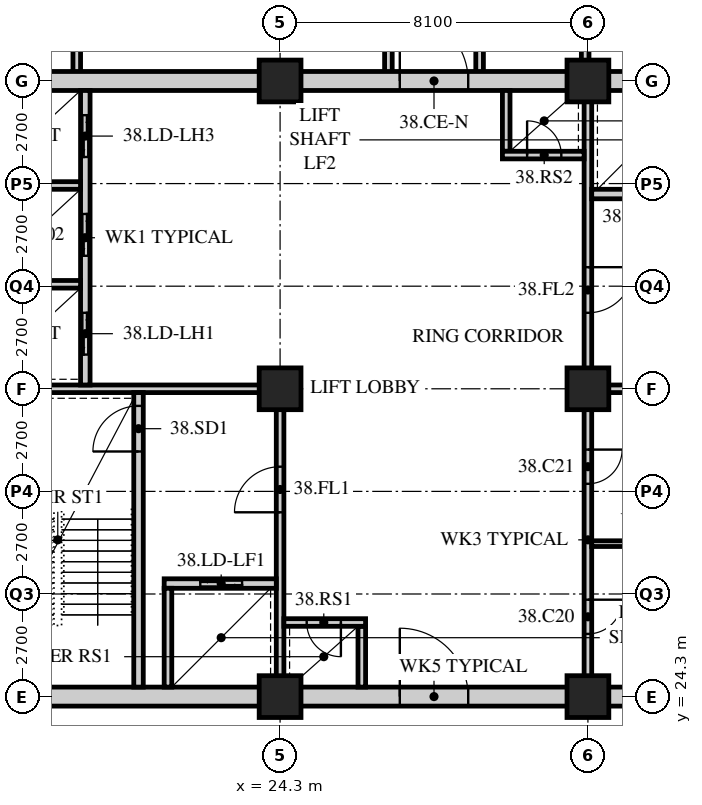
"""IFC4 building model, lengths in metres.
Left out: names, types, materials, properties, quantities, classifications, styles, units other than length and angle.
Written with IfcOpenShell. Run it as: python <this file> out.ifc"""

import sys

from ifc_helpers import new_model, si_unit, direction, frame, frame_2d, origin, origin_2d, place, context, subcontext, project, spatial, rectangle, hollow_rectangle, extrude, element, fill, save


model = new_model("IFC4")
c1 = context("Model", 3, precision=1e-05, world=origin(), true_north=direction((0.0, 1.0)))
c2 = subcontext(c1, "Body", "Model", "MODEL_VIEW")
j1 = project(units=[si_unit("LENGTHUNIT", "METRE"), si_unit("PLANEANGLEUNIT", "RADIAN")], contexts=[c1])
p1 = place(None, origin())
s1 = spatial("IfcSite", under=j1, at=p1, CompositionType="ELEMENT")
p2 = place(p1, origin())
s2 = spatial("IfcBuilding", under=s1, at=p2, CompositionType="ELEMENT")
p3 = place(p2, frame((0.0, 0.0, 147.6)))
s3 = spatial("IfcBuildingStorey", under=s2, at=p3, CompositionType="ELEMENT", Elevation=147.6)
for number, where, z_axis, x_axis in (
    (1, (24.3, 24.3, 0.0), (0.0, 0.0, 1.0), (1.0, 0.0, 0.0)),
    (2, (24.3, 32.4, 0.0), (0.0, 0.0, 1.0), (1.0, 0.0, 0.0)),
    (3, (24.3, 40.5, 0.0), (0.0, 0.0, 1.0), (1.0, 0.0, 0.0)),
    (4, (32.4, 24.3, 0.0), (0.0, 0.0, 1.0), (1.0, 0.0, 0.0)),
    (5, (32.4, 32.4, 0.0), (0.0, 0.0, 1.0), (1.0, 0.0, 0.0)),
    (6, (32.4, 40.5, 0.0), (0.0, 0.0, 1.0), (1.0, 0.0, 0.0)),
):
    element("IfcColumn", number, at=place(p3, frame(where, z_axis=z_axis, x_axis=x_axis)), inside=s3, PredefinedType="COLUMN", context=c2, shape_type="SweptSolid", body=[
        extrude(hollow_rectangle(XDim=1.1, YDim=1.1, WallThickness=0.1, at=origin_2d()), origin(), (0.0, 0.0, 1.0), 3.4),
    ])
p4 = place(p3, frame((18.95, 44.1, 0.0), z_axis=(0.0, 0.0, 1.0), x_axis=(0.0, -1.0, 0.0)))
e7 = element("IfcWall", 7, at=p4, inside=s3, PredefinedType="SOLIDWALL", context=c2, shape_type="SweptSolid", body=[
    extrude(rectangle(XDim=3.6, YDim=0.2, at=frame_2d((1.8, 0.0))), origin(), (0.0, 0.0, 1.0), 3.19),
])
p5 = place(p3, frame((32.328, 44.1, 0.0), z_axis=(0.0, 0.0, 1.0), x_axis=(0.0, -1.0, 0.0)))
e8 = element("IfcWall", 8, at=p5, inside=s3, PredefinedType="SOLIDWALL", context=c2, shape_type="SweptSolid", body=[
    extrude(rectangle(XDim=3.6, YDim=0.2, at=frame_2d((1.8, 0.0))), origin(), (0.0, 0.0, 1.0), 2.42),
])
for number, where, z_axis, x_axis in (
    (9, (27.15, 40.5, 0.0), (0.0, 0.0, 1.0), (0.0, 1.0, 0.0)),
    (10, (29.55, 40.5, 0.0), (0.0, 0.0, 1.0), (0.0, 1.0, 0.0)),
):
    element("IfcWall", number, at=place(p3, frame(where, z_axis=z_axis, x_axis=x_axis)), inside=s3, PredefinedType="SOLIDWALL", context=c2, shape_type="SweptSolid", body=[
        extrude(rectangle(XDim=3.6, YDim=0.2, at=frame_2d((1.8, 0.0))), origin(), (0.0, 0.0, 1.0), 3.19),
    ])
p6 = place(p3, frame((15.95, 24.3, 0.0), z_axis=(0.0, 0.0, 1.0), x_axis=(1.0, 0.0, 0.0)))
e11 = element("IfcWall", 11, at=p6, inside=s3, PredefinedType="SOLIDWALL", context=c2, shape_type="SweptSolid", body=[
    extrude(rectangle(XDim=24.8, YDim=0.5, at=frame_2d((12.4, 0.0))), origin(), (0.0, 0.0, 1.0), 2.42),
])
p7 = place(p6, frame((11.5, 0.0, 0.0)))
e12 = element("IfcOpeningElement", 12, at=p7, cuts=e11, PredefinedType="OPENING", context=c2, shape_type="SweptSolid", body=[
    extrude(rectangle(XDim=1.8, YDim=2.4, at=frame_2d((0.9, 1.2))), frame((0.0, 0.26, 0.0), z_axis=(0.0, -1.0, 0.0), x_axis=(1.0, 0.0, 0.0)), (0.0, 0.0, 1.0), 0.52),
])
p8 = place(p3, frame((15.95, 40.5, 0.0), z_axis=(0.0, 0.0, 1.0), x_axis=(1.0, 0.0, 0.0)))
e13 = element("IfcWall", 13, at=p8, inside=s3, PredefinedType="SOLIDWALL", context=c2, shape_type="SweptSolid", body=[
    extrude(rectangle(XDim=24.8, YDim=0.5, at=frame_2d((12.4, 0.0))), origin(), (0.0, 0.0, 1.0), 2.42),
])
p9 = place(p8, frame((11.5, 0.0, 0.0)))
e14 = element("IfcOpeningElement", 14, at=p9, cuts=e13, PredefinedType="OPENING", context=c2, shape_type="SweptSolid", body=[
    extrude(rectangle(XDim=1.8, YDim=2.4, at=frame_2d((0.9, 1.2))), frame((0.0, 0.26, 0.0), z_axis=(0.0, -1.0, 0.0), x_axis=(1.0, 0.0, 0.0)), (0.0, 0.0, 1.0), 0.52),
])
p10 = place(p3, frame((16.45, 32.4, 0.0), z_axis=(0.0, 0.0, 1.0), x_axis=(1.0, 0.0, 0.0)))
e15 = element("IfcWall", 15, at=p10, inside=s3, PredefinedType="SOLIDWALL", context=c2, shape_type="SweptSolid", body=[
    extrude(rectangle(XDim=7.95, YDim=0.2, at=frame_2d((3.975, 0.0))), origin(), (0.0, 0.0, 1.0), 2.578),
])
p11 = place(p3, frame((24.3, 24.55, 0.0), z_axis=(0.0, 0.0, 1.0), x_axis=(0.0, 1.0, 0.0)))
e16 = element("IfcWall", 16, at=p11, inside=s3, PredefinedType="SOLIDWALL", context=c2, shape_type="SweptSolid", body=[
    extrude(rectangle(XDim=7.75, YDim=0.2, at=frame_2d((3.875, 0.0))), origin(), (0.0, 0.0, 1.0), 2.578),
])
p12 = place(p11, frame((4.6, 0.0, 0.0)))
e17 = element("IfcOpeningElement", 17, at=p12, cuts=e16, PredefinedType="OPENING", context=c2, shape_type="SweptSolid", body=[
    extrude(rectangle(XDim=1.2, YDim=2.1, at=frame_2d((0.6, 1.05))), frame((0.0, 0.11, 0.0), z_axis=(0.0, -1.0, 0.0), x_axis=(1.0, 0.0, 0.0)), (0.0, 0.0, 1.0), 0.22),
])
p13 = place(p3, frame((20.575, 24.55, 0.0), z_axis=(0.0, 0.0, 1.0), x_axis=(0.0, 1.0, 0.0)))
e18 = element("IfcWall", 18, at=p13, inside=s3, PredefinedType="SOLIDWALL", context=c2, shape_type="SweptSolid", body=[
    extrude(rectangle(XDim=7.75, YDim=0.25, at=frame_2d((3.875, 0.0))), origin(), (0.0, 0.0, 1.0), 3.19),
])
p14 = place(p13, frame((6.2, 0.0, 0.0)))
e19 = element("IfcOpeningElement", 19, at=p14, cuts=e18, PredefinedType="OPENING", context=c2, shape_type="SweptSolid", body=[
    extrude(rectangle(XDim=1.2, YDim=2.1, at=frame_2d((0.6, 1.05))), frame((0.0, 0.135, 0.0), z_axis=(0.0, -1.0, 0.0), x_axis=(1.0, 0.0, 0.0)), (0.0, 0.0, 1.0), 0.27),
])
p15 = place(p3, frame((21.25, 27.275, 0.0), z_axis=(0.0, 0.0, 1.0), x_axis=(1.0, 0.0, 0.0)))
e20 = element("IfcWall", 20, at=p15, inside=s3, PredefinedType="SOLIDWALL", context=c2, shape_type="SweptSolid", body=[
    extrude(rectangle(XDim=2.95, YDim=0.25, at=frame_2d((1.475, 0.0))), origin(), (0.0, 0.0, 1.0), 3.19),
])
p16 = place(p15, frame((0.95, 0.0, 0.0)))
e21 = element("IfcOpeningElement", 21, at=p16, cuts=e20, PredefinedType="OPENING", context=c2, shape_type="SweptSolid", body=[
    extrude(rectangle(XDim=1.1, YDim=2.4, at=frame_2d((0.55, 1.2))), frame((0.0, 0.135, 0.0), z_axis=(0.0, -1.0, 0.0), x_axis=(1.0, 0.0, 0.0)), (0.0, 0.0, 1.0), 0.27),
])
p17 = place(p3, frame((21.35, 24.55, 0.0), z_axis=(0.0, 0.0, 1.0), x_axis=(0.0, 1.0, 0.0)))
e22 = element("IfcWall", 22, at=p17, inside=s3, PredefinedType="SOLIDWALL", context=c2, shape_type="SweptSolid", body=[
    extrude(rectangle(XDim=2.6, YDim=0.2, at=frame_2d((1.3, 0.0))), origin(), (0.0, 0.0, 1.0), 3.19),
])
p18 = place(p3, frame((19.175, 32.5, 0.0), z_axis=(0.0, 0.0, 1.0), x_axis=(0.0, 1.0, 0.0)))
e23 = element("IfcWall", 23, at=p18, inside=s3, PredefinedType="SOLIDWALL", context=c2, shape_type="SweptSolid", body=[
    extrude(rectangle(XDim=7.75, YDim=0.25, at=frame_2d((3.875, 0.0))), origin(), (0.0, 0.0, 1.0), 3.19),
])
p19 = place(p18, frame((0.8, 0.0, 0.0)))
e24 = element("IfcOpeningElement", 24, at=p19, cuts=e23, PredefinedType="OPENING", context=c2, shape_type="SweptSolid", body=[
    extrude(rectangle(XDim=1.1, YDim=2.4, at=frame_2d((0.55, 1.2))), frame((0.0, 0.135, 0.0), z_axis=(0.0, -1.0, 0.0), x_axis=(1.0, 0.0, 0.0)), (0.0, 0.0, 1.0), 0.27),
])
p20 = place(p18, frame((3.4, 0.0, 0.0)))
e25 = element("IfcOpeningElement", 25, at=p20, cuts=e23, PredefinedType="OPENING", context=c2, shape_type="SweptSolid", body=[
    extrude(rectangle(XDim=1.1, YDim=2.4, at=frame_2d((0.55, 1.2))), frame((0.0, 0.135, 0.0), z_axis=(0.0, -1.0, 0.0), x_axis=(1.0, 0.0, 0.0)), (0.0, 0.0, 1.0), 0.27),
])
p21 = place(p18, frame((6.0, 0.0, 0.0)))
e26 = element("IfcOpeningElement", 26, at=p21, cuts=e23, PredefinedType="OPENING", context=c2, shape_type="SweptSolid", body=[
    extrude(rectangle(XDim=1.1, YDim=2.4, at=frame_2d((0.55, 1.2))), frame((0.0, 0.135, 0.0), z_axis=(0.0, -1.0, 0.0), x_axis=(1.0, 0.0, 0.0)), (0.0, 0.0, 1.0), 0.27),
])
for number, where, z_axis, x_axis in (
    (27, (16.45, 35.15, 0.0), (0.0, 0.0, 1.0), (1.0, 0.0, 0.0)),
    (28, (16.45, 37.75, 0.0), (0.0, 0.0, 1.0), (1.0, 0.0, 0.0)),
):
    element("IfcWall", number, at=place(p3, frame(where, z_axis=z_axis, x_axis=x_axis)), inside=s3, PredefinedType="SOLIDWALL", context=c2, shape_type="SweptSolid", body=[
        extrude(rectangle(XDim=2.6, YDim=0.2, at=frame_2d((1.3, 0.0))), origin(), (0.0, 0.0, 1.0), 3.19),
    ])
p22 = place(p3, frame((26.45, 24.55, 0.0), z_axis=(0.0, 0.0, 1.0), x_axis=(0.0, 1.0, 0.0)))
e29 = element("IfcWall", 29, at=p22, inside=s3, PredefinedType="SOLIDWALL", context=c2, shape_type="SweptSolid", body=[
    extrude(rectangle(XDim=1.6, YDim=0.2, at=frame_2d((0.8, 0.0))), origin(), (0.0, 0.0, 1.0), 3.19),
])
p23 = place(p3, frame((24.4, 26.25, 0.0), z_axis=(0.0, 0.0, 1.0), x_axis=(1.0, 0.0, 0.0)))
e30 = element("IfcWall", 30, at=p23, inside=s3, PredefinedType="SOLIDWALL", context=c2, shape_type="SweptSolid", body=[
    extrude(rectangle(XDim=2.15, YDim=0.2, at=frame_2d((1.075, 0.0))), origin(), (0.0, 0.0, 1.0), 3.19),
])
p24 = place(p23, frame((0.6, 0.0, 0.0)))
e31 = element("IfcOpeningElement", 31, at=p24, cuts=e30, PredefinedType="OPENING", context=c2, shape_type="SweptSolid", body=[
    extrude(rectangle(XDim=0.9, YDim=2.1, at=frame_2d((0.45, 1.05))), frame((0.0, 0.11, 0.0), z_axis=(0.0, -1.0, 0.0), x_axis=(1.0, 0.0, 0.0)), (0.0, 0.0, 1.0), 0.22),
])
p25 = place(p3, frame((32.3, 32.4, 0.0), z_axis=(0.0, 0.0, 1.0), x_axis=(1.0, 0.0, 0.0)))
e32 = element("IfcWall", 32, at=p25, inside=s3, PredefinedType="SOLIDWALL", context=c2, shape_type="SweptSolid", body=[
    extrude(rectangle(XDim=7.95, YDim=0.2, at=frame_2d((3.975, 0.0))), origin(), (0.0, 0.0, 1.0), 2.578),
])
p26 = place(p3, frame((32.4, 32.5, 0.0), z_axis=(0.0, 0.0, 1.0), x_axis=(0.0, 1.0, 0.0)))
e33 = element("IfcWall", 33, at=p26, inside=s3, PredefinedType="SOLIDWALL", context=c2, shape_type="SweptSolid", body=[
    extrude(rectangle(XDim=7.75, YDim=0.2, at=frame_2d((3.875, 0.0))), origin(), (0.0, 0.0, 1.0), 2.578),
])
p27 = place(p26, frame((1.9, 0.0, 0.0)))
e34 = element("IfcOpeningElement", 34, at=p27, cuts=e33, PredefinedType="OPENING", context=c2, shape_type="SweptSolid", body=[
    extrude(rectangle(XDim=1.2, YDim=2.1, at=frame_2d((0.6, 1.05))), frame((0.0, 0.11, 0.0), z_axis=(0.0, -1.0, 0.0), x_axis=(1.0, 0.0, 0.0)), (0.0, 0.0, 1.0), 0.22),
])
p28 = place(p3, frame((32.5, 37.525, 0.0), z_axis=(0.0, 0.0, 1.0), x_axis=(1.0, 0.0, 0.0)))
e35 = element("IfcWall", 35, at=p28, inside=s3, PredefinedType="SOLIDWALL", context=c2, shape_type="SweptSolid", body=[
    extrude(rectangle(XDim=2.95, YDim=0.25, at=frame_2d((1.475, 0.0))), origin(), (0.0, 0.0, 1.0), 3.19),
])
p29 = place(p28, frame((0.9, 0.0, 0.0)))
e36 = element("IfcOpeningElement", 36, at=p29, cuts=e35, PredefinedType="OPENING", context=c2, shape_type="SweptSolid", body=[
    extrude(rectangle(XDim=1.1, YDim=2.4, at=frame_2d((0.55, 1.2))), frame((0.0, 0.135, 0.0), z_axis=(0.0, -1.0, 0.0), x_axis=(1.0, 0.0, 0.0)), (0.0, 0.0, 1.0), 0.27),
])
p30 = place(p3, frame((30.25, 38.65, 0.0), z_axis=(0.0, 0.0, 1.0), x_axis=(0.0, 1.0, 0.0)))
e37 = element("IfcWall", 37, at=p30, inside=s3, PredefinedType="SOLIDWALL", context=c2, shape_type="SweptSolid", body=[
    extrude(rectangle(XDim=1.6, YDim=0.2, at=frame_2d((0.8, 0.0))), origin(), (0.0, 0.0, 1.0), 3.19),
])
p31 = place(p3, frame((30.15, 38.55, 0.0), z_axis=(0.0, 0.0, 1.0), x_axis=(1.0, 0.0, 0.0)))
e38 = element("IfcWall", 38, at=p31, inside=s3, PredefinedType="SOLIDWALL", context=c2, shape_type="SweptSolid", body=[
    extrude(rectangle(XDim=2.15, YDim=0.2, at=frame_2d((1.075, 0.0))), origin(), (0.0, 0.0, 1.0), 3.19),
])
p32 = place(p31, frame((0.65, 0.0, 0.0)))
e39 = element("IfcOpeningElement", 39, at=p32, cuts=e38, PredefinedType="OPENING", context=c2, shape_type="SweptSolid", body=[
    extrude(rectangle(XDim=0.9, YDim=2.1, at=frame_2d((0.45, 1.05))), frame((0.0, 0.11, 0.0), z_axis=(0.0, -1.0, 0.0), x_axis=(1.0, 0.0, 0.0)), (0.0, 0.0, 1.0), 0.22),
])
p33 = place(p3, frame((32.4, 24.55, 0.0), z_axis=(0.0, 0.0, 1.0), x_axis=(0.0, 1.0, 0.0)))
e40 = element("IfcWall", 40, at=p33, inside=s3, PredefinedType="PARTITIONING", context=c2, shape_type="SweptSolid", body=[
    extrude(rectangle(XDim=7.75, YDim=0.2, at=frame_2d((3.875, 0.0))), origin(), (0.0, 0.0, 1.0), 2.578),
])
p34 = place(p33, frame((1.4, 0.0, 0.0)))
e41 = element("IfcOpeningElement", 41, at=p34, cuts=e40, PredefinedType="OPENING", context=c2, shape_type="SweptSolid", body=[
    extrude(rectangle(XDim=0.9, YDim=2.1, at=frame_2d((0.45, 1.05))), frame((0.0, 0.11, 0.0), z_axis=(0.0, -1.0, 0.0), x_axis=(1.0, 0.0, 0.0)), (0.0, 0.0, 1.0), 0.22),
])
p35 = place(p33, frame((5.35, 0.0, 0.0)))
e42 = element("IfcOpeningElement", 42, at=p35, cuts=e40, PredefinedType="OPENING", context=c2, shape_type="SweptSolid", body=[
    extrude(rectangle(XDim=0.9, YDim=2.1, at=frame_2d((0.45, 1.05))), frame((0.0, 0.11, 0.0), z_axis=(0.0, -1.0, 0.0), x_axis=(1.0, 0.0, 0.0)), (0.0, 0.0, 1.0), 0.22),
])
p36 = place(p3, frame((32.5, 28.325, 0.0), z_axis=(0.0, 0.0, 1.0), x_axis=(1.0, 0.0, 0.0)))
e43 = element("IfcWall", 43, at=p36, inside=s3, PredefinedType="PARTITIONING", context=c2, shape_type="SweptSolid", body=[
    extrude(rectangle(XDim=4.9, YDim=0.15, at=frame_2d((2.45, 0.0))), origin(), (0.0, 0.0, 1.0), 3.19),
])
p37 = place(p34, origin())
e44 = element("IfcDoor", 44, at=p37, inside=s3, OperationType="SINGLE_SWING_LEFT", PredefinedType="DOOR", context=c2, shape_type="SweptSolid", body=[
    extrude(rectangle(XDim=0.9, YDim=2.1, at=frame_2d((0.45, 1.05))), frame((0.0, 0.025, 0.0), z_axis=(0.0, -1.0, 0.0), x_axis=(1.0, 0.0, 0.0)), (0.0, 0.0, 1.0), 0.05),
])
fill(e41, e44)
p38 = place(p35, origin())
e45 = element("IfcDoor", 45, at=p38, inside=s3, OperationType="SINGLE_SWING_LEFT", PredefinedType="DOOR", context=c2, shape_type="SweptSolid", body=[
    extrude(rectangle(XDim=0.9, YDim=2.1, at=frame_2d((0.45, 1.05))), frame((0.0, 0.025, 0.0), z_axis=(0.0, -1.0, 0.0), x_axis=(1.0, 0.0, 0.0)), (0.0, 0.0, 1.0), 0.05),
])
fill(e42, e45)
p39 = place(p14, origin())
e46 = element("IfcDoor", 46, at=p39, inside=s3, OperationType="SINGLE_SWING_LEFT", PredefinedType="DOOR", context=c2, shape_type="SweptSolid", body=[
    extrude(rectangle(XDim=1.2, YDim=2.1, at=frame_2d((0.6, 1.05))), frame((0.0, 0.025, 0.0), z_axis=(0.0, -1.0, 0.0), x_axis=(1.0, 0.0, 0.0)), (0.0, 0.0, 1.0), 0.05),
])
fill(e19, e46)
p40 = place(p12, origin())
e47 = element("IfcDoor", 47, at=p40, inside=s3, OperationType="SINGLE_SWING_LEFT", PredefinedType="DOOR", context=c2, shape_type="SweptSolid", body=[
    extrude(rectangle(XDim=1.2, YDim=2.1, at=frame_2d((0.6, 1.05))), frame((0.0, 0.025, 0.0), z_axis=(0.0, -1.0, 0.0), x_axis=(1.0, 0.0, 0.0)), (0.0, 0.0, 1.0), 0.05),
])
fill(e17, e47)
p41 = place(p24, origin())
e48 = element("IfcDoor", 48, at=p41, inside=s3, OperationType="SINGLE_SWING_LEFT", PredefinedType="DOOR", context=c2, shape_type="SweptSolid", body=[
    extrude(rectangle(XDim=0.9, YDim=2.1, at=frame_2d((0.45, 1.05))), frame((0.0, 0.025, 0.0), z_axis=(0.0, -1.0, 0.0), x_axis=(1.0, 0.0, 0.0)), (0.0, 0.0, 1.0), 0.05),
])
fill(e31, e48)
p42 = place(p27, origin())
e49 = element("IfcDoor", 49, at=p42, inside=s3, OperationType="SINGLE_SWING_LEFT", PredefinedType="DOOR", context=c2, shape_type="SweptSolid", body=[
    extrude(rectangle(XDim=1.2, YDim=2.1, at=frame_2d((0.6, 1.05))), frame((0.0, 0.025, 0.0), z_axis=(0.0, -1.0, 0.0), x_axis=(1.0, 0.0, 0.0)), (0.0, 0.0, 1.0), 0.05),
])
fill(e34, e49)
p43 = place(p32, origin())
e50 = element("IfcDoor", 50, at=p43, inside=s3, OperationType="SINGLE_SWING_LEFT", PredefinedType="DOOR", context=c2, shape_type="SweptSolid", body=[
    extrude(rectangle(XDim=0.9, YDim=2.1, at=frame_2d((0.45, 1.05))), frame((0.0, 0.025, 0.0), z_axis=(0.0, -1.0, 0.0), x_axis=(1.0, 0.0, 0.0)), (0.0, 0.0, 1.0), 0.05),
])
fill(e39, e50)
p44 = place(p19, origin())
e51 = element("IfcDoor", 51, at=p44, inside=s3, OperationType="DOUBLE_DOOR_SLIDING", PredefinedType="DOOR", context=c2, shape_type="SweptSolid", body=[
    extrude(rectangle(XDim=1.1, YDim=2.4, at=frame_2d((0.55, 1.2))), frame((0.0, 0.025, 0.0), z_axis=(0.0, -1.0, 0.0), x_axis=(1.0, 0.0, 0.0)), (0.0, 0.0, 1.0), 0.05),
])
fill(e24, e51)
p45 = place(p20, origin())
e52 = element("IfcDoor", 52, at=p45, inside=s3, OperationType="DOUBLE_DOOR_SLIDING", PredefinedType="DOOR", context=c2, shape_type="SweptSolid", body=[
    extrude(rectangle(XDim=1.1, YDim=2.4, at=frame_2d((0.55, 1.2))), frame((0.0, 0.025, 0.0), z_axis=(0.0, -1.0, 0.0), x_axis=(1.0, 0.0, 0.0)), (0.0, 0.0, 1.0), 0.05),
])
fill(e25, e52)
p46 = place(p21, origin())
e53 = element("IfcDoor", 53, at=p46, inside=s3, OperationType="DOUBLE_DOOR_SLIDING", PredefinedType="DOOR", context=c2, shape_type="SweptSolid", body=[
    extrude(rectangle(XDim=1.1, YDim=2.4, at=frame_2d((0.55, 1.2))), frame((0.0, 0.025, 0.0), z_axis=(0.0, -1.0, 0.0), x_axis=(1.0, 0.0, 0.0)), (0.0, 0.0, 1.0), 0.05),
])
fill(e26, e53)
p47 = place(p16, origin())
e54 = element("IfcDoor", 54, at=p47, inside=s3, OperationType="DOUBLE_DOOR_SLIDING", PredefinedType="DOOR", context=c2, shape_type="SweptSolid", body=[
    extrude(rectangle(XDim=1.1, YDim=2.4, at=frame_2d((0.55, 1.2))), frame((0.0, 0.025, 0.0), z_axis=(0.0, -1.0, 0.0), x_axis=(1.0, 0.0, 0.0)), (0.0, 0.0, 1.0), 0.05),
])
fill(e21, e54)
p48 = place(p7, origin())
e55 = element("IfcDoor", 55, at=p48, inside=s3, OperationType="DOUBLE_DOOR_SINGLE_SWING", PredefinedType="DOOR", context=c2, shape_type="SweptSolid", body=[
    extrude(rectangle(XDim=1.8, YDim=2.4, at=frame_2d((0.9, 1.2))), frame((0.0, 0.025, 0.0), z_axis=(0.0, -1.0, 0.0), x_axis=(1.0, 0.0, 0.0)), (0.0, 0.0, 1.0), 0.05),
])
fill(e12, e55)
p49 = place(p9, origin())
e56 = element("IfcDoor", 56, at=p49, inside=s3, OperationType="DOUBLE_DOOR_SINGLE_SWING", PredefinedType="DOOR", context=c2, shape_type="SweptSolid", body=[
    extrude(rectangle(XDim=1.8, YDim=2.4, at=frame_2d((0.9, 1.2))), frame((0.0, 0.025, 0.0), z_axis=(0.0, -1.0, 0.0), x_axis=(1.0, 0.0, 0.0)), (0.0, 0.0, 1.0), 0.05),
])
fill(e14, e56)
save(model, sys.argv[1])
